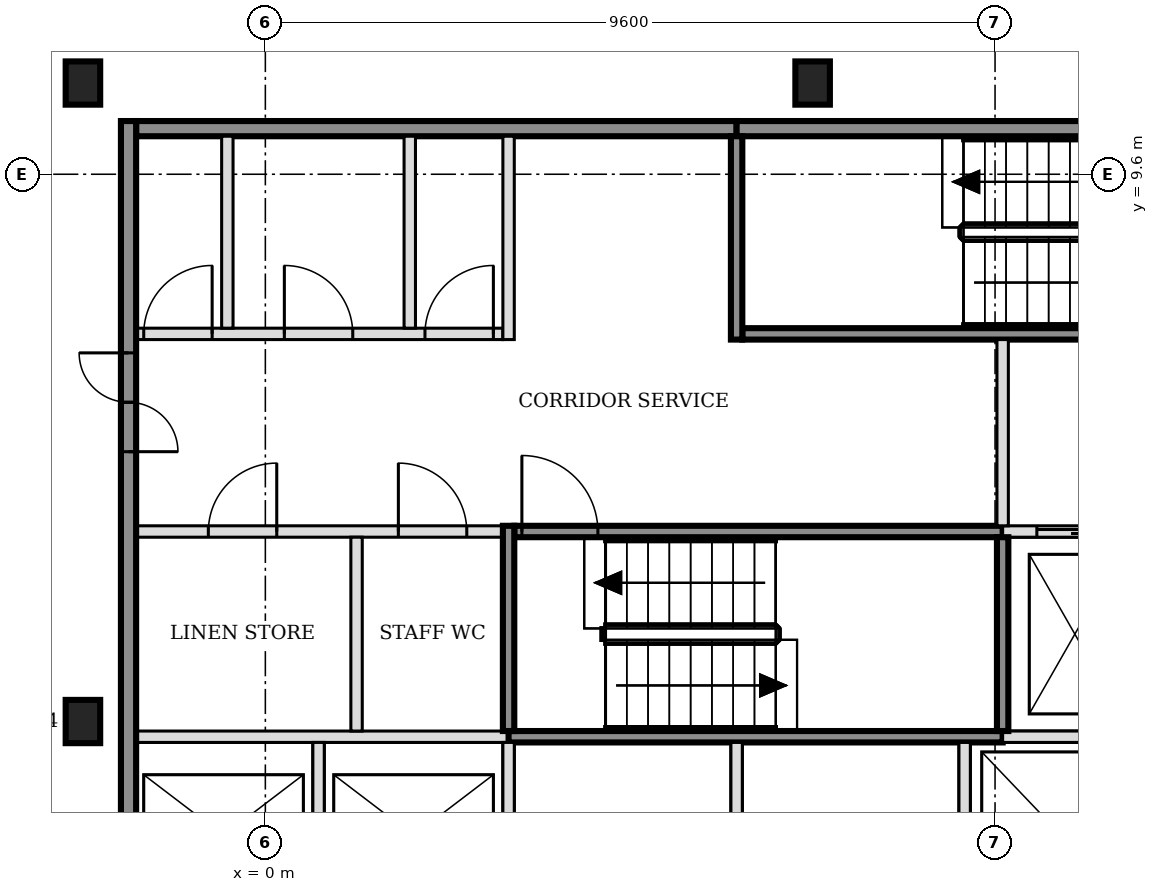
"""IFC4 building model, lengths in metres.
Left out: names, types, materials, properties, quantities, classifications, styles, units other than length and angle.
Written with IfcOpenShell. Run it as: python <this file> out.ifc"""

import sys

from ifc_helpers import new_model, si_unit, direction, frame, frame_2d, origin, origin_2d, place, context, subcontext, project, spatial, rectangle, i_section, extrude, element, fill, save


model = new_model("IFC4")
c1 = context("Model", 3, precision=1e-05, world=origin(), true_north=direction((0.0, 1.0)))
c2 = subcontext(c1, "Body", "Model", "MODEL_VIEW")
j1 = project(units=[si_unit("LENGTHUNIT", "METRE"), si_unit("PLANEANGLEUNIT", "RADIAN")], contexts=[c1])
p1 = place(None, origin())
s1 = spatial("IfcSite", under=j1, at=p1, CompositionType="ELEMENT")
p2 = place(p1, origin())
s2 = spatial("IfcBuilding", under=s1, at=p2, CompositionType="ELEMENT")
p3 = place(p2, frame((0.0, 0.0, 15.0)))
s3 = spatial("IfcBuildingStorey", under=s2, at=p3, CompositionType="ELEMENT", Elevation=15.0)
for number, where, z_axis, x_axis in (
    (1, (-2.4, 2.4, -0.2), (0.0, 0.0, 1.0), (1.0, 0.0, 0.0)),
    (2, (-2.4, 10.8, -0.2), (0.0, 0.0, 1.0), (1.0, 0.0, 0.0)),
    (3, (7.2, 10.8, -0.2), (0.0, 0.0, 1.0), (1.0, 0.0, 0.0)),
):
    element("IfcColumn", number, at=place(p3, frame(where, z_axis=z_axis, x_axis=x_axis)), inside=s3, PredefinedType="COLUMN", context=c2, shape_type="SweptSolid", body=[
        extrude(i_section(OverallWidth=0.454, OverallDepth=0.569, WebThickness=0.078, FlangeThickness=0.125, FilletRadius=0.015, at=origin_2d()), origin(), (0.0, 0.0, 1.0), 6.0),
    ])
p4 = place(p3, frame((-1.7, 2.2, 0.0), z_axis=(0.0, 0.0, 1.0), x_axis=(1.0, 0.0, 0.0)))
e4 = element("IfcWall", 4, at=p4, inside=s3, PredefinedType="SOLIDWALL", context=c2, shape_type="SweptSolid", body=[
    extrude(rectangle(XDim=4.9, YDim=0.15, at=frame_2d((2.45, 0.0))), origin(), (0.0, 0.0, 1.0), 5.8),
])
p5 = place(p3, frame((3.2, 2.2, 0.0), z_axis=(0.0, 0.0, 1.0), x_axis=(1.0, 0.0, 0.0)))
e5 = element("IfcWall", 5, at=p5, inside=s3, PredefinedType="SOLIDWALL", context=c2, shape_type="SweptSolid", body=[
    extrude(rectangle(XDim=6.5, YDim=0.15, at=frame_2d((3.25, 0.0))), origin(), (0.0, 0.0, 1.0), 5.8),
])
p6 = place(p3, frame((9.7, 2.2, 0.0), z_axis=(0.0, 0.0, 1.0), x_axis=(1.0, 0.0, 0.0)))
e6 = element("IfcWall", 6, at=p6, inside=s3, PredefinedType="SOLIDWALL", context=c2, shape_type="SweptSolid", body=[
    extrude(rectangle(XDim=4.525, YDim=0.15, at=frame_2d((2.263, 0.0))), origin(), (0.0, 0.0, 1.0), 5.8),
])
p7 = place(p3, frame((-1.7, 4.9, 0.0), z_axis=(0.0, 0.0, 1.0), x_axis=(1.0, 0.0, 0.0)))
e7 = element("IfcWall", 7, at=p7, inside=s3, PredefinedType="PARTITIONING", context=c2, shape_type="SweptSolid", body=[
    extrude(rectangle(XDim=4.825, YDim=0.15, at=frame_2d((2.413, 0.0))), origin(), (0.0, 0.0, 1.0), 5.8),
])
p8 = place(p7, frame((0.95, 0.0, 0.0)))
e8 = element("IfcOpeningElement", 8, at=p8, cuts=e7, PredefinedType="OPENING", context=c2, shape_type="SweptSolid", body=[
    extrude(rectangle(XDim=0.9, YDim=2.1, at=frame_2d((0.45, 1.05))), frame((0.0, 0.085, 0.0), z_axis=(0.0, -1.0, 0.0), x_axis=(1.0, 0.0, 0.0)), (0.0, 0.0, 1.0), 0.17),
])
p9 = place(p7, frame((3.45, 0.0, 0.0)))
e9 = element("IfcOpeningElement", 9, at=p9, cuts=e7, PredefinedType="OPENING", context=c2, shape_type="SweptSolid", body=[
    extrude(rectangle(XDim=0.9, YDim=2.1, at=frame_2d((0.45, 1.05))), frame((0.0, 0.085, 0.0), z_axis=(0.0, -1.0, 0.0), x_axis=(1.0, 0.0, 0.0)), (0.0, 0.0, 1.0), 0.17),
])
p10 = place(p3, frame((3.275, 4.9, 0.0), z_axis=(0.0, 0.0, 1.0), x_axis=(1.0, 0.0, 0.0)))
e10 = element("IfcWall", 10, at=p10, inside=s3, PredefinedType="SOLIDWALL", context=c2, shape_type="SweptSolid", body=[
    extrude(rectangle(XDim=6.425, YDim=0.15, at=frame_2d((3.212, 0.0))), origin(), (0.0, 0.0, 1.0), 5.8),
])
p11 = place(p10, frame((0.1, 0.0, 0.0)))
e11 = element("IfcOpeningElement", 11, at=p11, cuts=e10, PredefinedType="OPENING", context=c2, shape_type="SweptSolid", body=[
    extrude(rectangle(XDim=1.0, YDim=2.1, at=frame_2d((0.5, 1.05))), frame((0.0, 0.085, 0.0), z_axis=(0.0, -1.0, 0.0), x_axis=(1.0, 0.0, 0.0)), (0.0, 0.0, 1.0), 0.17),
])
p12 = place(p3, frame((9.7, 4.9, 0.0), z_axis=(0.0, 0.0, 1.0), x_axis=(1.0, 0.0, 0.0)))
e12 = element("IfcWall", 12, at=p12, inside=s3, PredefinedType="SOLIDWALL", context=c2, shape_type="SweptSolid", body=[
    extrude(rectangle(XDim=6.4, YDim=0.15, at=frame_2d((3.2, 0.0))), origin(), (0.0, 0.0, 1.0), 5.8),
])
p13 = place(p12, frame((0.45, 0.0, 0.0)))
e13 = element("IfcOpeningElement", 13, at=p13, cuts=e12, PredefinedType="OPENING", context=c2, shape_type="SweptSolid", body=[
    extrude(rectangle(XDim=1.0, YDim=2.1, at=frame_2d((0.5, 1.05))), frame((0.0, 0.085, 0.0), z_axis=(0.0, -1.0, 0.0), x_axis=(1.0, 0.0, 0.0)), (0.0, 0.0, 1.0), 0.17),
])
p14 = place(p12, frame((2.35, 0.0, 0.0)))
e14 = element("IfcOpeningElement", 14, at=p14, cuts=e12, PredefinedType="OPENING", context=c2, shape_type="SweptSolid", body=[
    extrude(rectangle(XDim=1.0, YDim=2.1, at=frame_2d((0.5, 1.05))), frame((0.0, 0.085, 0.0), z_axis=(0.0, -1.0, 0.0), x_axis=(1.0, 0.0, 0.0)), (0.0, 0.0, 1.0), 0.17),
])
p15 = place(p12, frame((4.7, 0.0, 0.0)))
e15 = element("IfcOpeningElement", 15, at=p15, cuts=e12, PredefinedType="OPENING", context=c2, shape_type="SweptSolid", body=[
    extrude(rectangle(XDim=0.9, YDim=2.1, at=frame_2d((0.45, 1.05))), frame((0.0, 0.085, 0.0), z_axis=(0.0, -1.0, 0.0), x_axis=(1.0, 0.0, 0.0)), (0.0, 0.0, 1.0), 0.17),
])
p16 = place(p3, frame((-1.7, 7.5, 0.0), z_axis=(0.0, 0.0, 1.0), x_axis=(1.0, 0.0, 0.0)))
e16 = element("IfcWall", 16, at=p16, inside=s3, PredefinedType="PARTITIONING", context=c2, shape_type="SweptSolid", body=[
    extrude(rectangle(XDim=4.825, YDim=0.15, at=frame_2d((2.413, 0.0))), origin(), (0.0, 0.0, 1.0), 5.8),
])
p17 = place(p16, frame((0.1, 0.0, 0.0)))
e17 = element("IfcOpeningElement", 17, at=p17, cuts=e16, PredefinedType="OPENING", context=c2, shape_type="SweptSolid", body=[
    extrude(rectangle(XDim=0.9, YDim=2.1, at=frame_2d((0.45, 1.05))), frame((0.0, 0.085, 0.0), z_axis=(0.0, -1.0, 0.0), x_axis=(1.0, 0.0, 0.0)), (0.0, 0.0, 1.0), 0.17),
])
p18 = place(p16, frame((1.95, 0.0, 0.0)))
e18 = element("IfcOpeningElement", 18, at=p18, cuts=e16, PredefinedType="OPENING", context=c2, shape_type="SweptSolid", body=[
    extrude(rectangle(XDim=0.9, YDim=2.1, at=frame_2d((0.45, 1.05))), frame((0.0, 0.085, 0.0), z_axis=(0.0, -1.0, 0.0), x_axis=(1.0, 0.0, 0.0)), (0.0, 0.0, 1.0), 0.17),
])
p19 = place(p16, frame((3.8, 0.0, 0.0)))
e19 = element("IfcOpeningElement", 19, at=p19, cuts=e16, PredefinedType="OPENING", context=c2, shape_type="SweptSolid", body=[
    extrude(rectangle(XDim=0.9, YDim=2.1, at=frame_2d((0.45, 1.05))), frame((0.0, 0.085, 0.0), z_axis=(0.0, -1.0, 0.0), x_axis=(1.0, 0.0, 0.0)), (0.0, 0.0, 1.0), 0.17),
])
p20 = place(p3, frame((6.275, 7.5, 0.0), z_axis=(0.0, 0.0, 1.0), x_axis=(1.0, 0.0, 0.0)))
e20 = element("IfcWall", 20, at=p20, inside=s3, PredefinedType="SOLIDWALL", context=c2, shape_type="SweptSolid", body=[
    extrude(rectangle(XDim=6.425, YDim=0.15, at=frame_2d((3.212, 0.0))), origin(), (0.0, 0.0, 1.0), 5.8),
])
p21 = place(p20, frame((5.225, 0.0, 0.0)))
e21 = element("IfcOpeningElement", 21, at=p21, cuts=e20, PredefinedType="OPENING", context=c2, shape_type="SweptSolid", body=[
    extrude(rectangle(XDim=1.0, YDim=2.1, at=frame_2d((0.5, 1.05))), frame((0.0, 0.085, 0.0), z_axis=(0.0, -1.0, 0.0), x_axis=(1.0, 0.0, 0.0)), (0.0, 0.0, 1.0), 0.17),
])
p22 = place(p3, frame((-1.7, 10.2, 0.0), z_axis=(0.0, 0.0, 1.0), x_axis=(1.0, 0.0, 0.0)))
e22 = element("IfcWall", 22, at=p22, inside=s3, PredefinedType="SOLIDWALL", context=c2, shape_type="SweptSolid", body=[
    extrude(rectangle(XDim=7.9, YDim=0.2, at=frame_2d((3.95, 0.0))), origin(), (0.0, 0.0, 1.0), 5.8),
])
p23 = place(p3, frame((6.2, 10.2, 0.0), z_axis=(0.0, 0.0, 1.0), x_axis=(1.0, 0.0, 0.0)))
e23 = element("IfcWall", 23, at=p23, inside=s3, PredefinedType="SOLIDWALL", context=c2, shape_type="SweptSolid", body=[
    extrude(rectangle(XDim=6.5, YDim=0.2, at=frame_2d((3.25, 0.0))), origin(), (0.0, 0.0, 1.0), 5.8),
])
p24 = place(p3, frame((-1.8, -5.5, 0.0), z_axis=(0.0, 0.0, 1.0), x_axis=(0.0, 1.0, 0.0)))
e24 = element("IfcWall", 24, at=p24, inside=s3, PredefinedType="SOLIDWALL", context=c2, shape_type="SweptSolid", body=[
    extrude(rectangle(XDim=15.8, YDim=0.2, at=frame_2d((7.9, 0.0))), origin(), (0.0, 0.0, 1.0), 5.8),
])
p25 = place(p24, frame((3.05, 0.0, 0.0)))
e25 = element("IfcOpeningElement", 25, at=p25, cuts=e24, PredefinedType="OPENING", context=c2, shape_type="SweptSolid", body=[
    extrude(rectangle(XDim=1.3, YDim=2.1, at=frame_2d((0.65, 1.05))), frame((0.0, 0.11, 0.0), z_axis=(0.0, -1.0, 0.0), x_axis=(1.0, 0.0, 0.0)), (0.0, 0.0, 1.0), 0.22),
])
p26 = place(p24, frame((11.45, 0.0, 0.0)))
e26 = element("IfcOpeningElement", 26, at=p26, cuts=e24, PredefinedType="OPENING", context=c2, shape_type="SweptSolid", body=[
    extrude(rectangle(XDim=1.3, YDim=2.1, at=frame_2d((0.65, 1.05))), frame((0.0, 0.11, 0.0), z_axis=(0.0, -1.0, 0.0), x_axis=(1.0, 0.0, 0.0)), (0.0, 0.0, 1.0), 0.22),
])
p27 = place(p3, frame((-0.5, 7.575, 0.0), z_axis=(0.0, 0.0, 1.0), x_axis=(0.0, 1.0, 0.0)))
e27 = element("IfcWall", 27, at=p27, inside=s3, PredefinedType="PARTITIONING", context=c2, shape_type="SweptSolid", body=[
    extrude(rectangle(XDim=2.525, YDim=0.15, at=frame_2d((1.263, 0.0))), origin(), (0.0, 0.0, 1.0), 5.8),
])
p28 = place(p3, frame((0.7, -0.325, 0.0), z_axis=(0.0, 0.0, 1.0), x_axis=(0.0, 1.0, 0.0)))
e28 = element("IfcWall", 28, at=p28, inside=s3, PredefinedType="SOLIDWALL", context=c2, shape_type="SweptSolid", body=[
    extrude(rectangle(XDim=2.45, YDim=0.15, at=frame_2d((1.225, 0.0))), origin(), (0.0, 0.0, 1.0), 5.8),
])
p29 = place(p3, frame((1.2, 2.275, 0.0), z_axis=(0.0, 0.0, 1.0), x_axis=(0.0, 1.0, 0.0)))
e29 = element("IfcWall", 29, at=p29, inside=s3, PredefinedType="PARTITIONING", context=c2, shape_type="SweptSolid", body=[
    extrude(rectangle(XDim=2.55, YDim=0.15, at=frame_2d((1.275, 0.0))), origin(), (0.0, 0.0, 1.0), 5.8),
])
p30 = place(p3, frame((1.9, 7.575, 0.0), z_axis=(0.0, 0.0, 1.0), x_axis=(0.0, 1.0, 0.0)))
e30 = element("IfcWall", 30, at=p30, inside=s3, PredefinedType="PARTITIONING", context=c2, shape_type="SweptSolid", body=[
    extrude(rectangle(XDim=2.525, YDim=0.15, at=frame_2d((1.263, 0.0))), origin(), (0.0, 0.0, 1.0), 5.8),
])
p31 = place(p3, frame((3.2, -0.325, 0.0), z_axis=(0.0, 0.0, 1.0), x_axis=(0.0, 1.0, 0.0)))
e31 = element("IfcWall", 31, at=p31, inside=s3, PredefinedType="SOLIDWALL", context=c2, shape_type="SweptSolid", body=[
    extrude(rectangle(XDim=2.45, YDim=0.15, at=frame_2d((1.225, 0.0))), origin(), (0.0, 0.0, 1.0), 5.8),
])
p32 = place(p3, frame((3.2, 2.275, 0.0), z_axis=(0.0, 0.0, 1.0), x_axis=(0.0, 1.0, 0.0)))
e32 = element("IfcWall", 32, at=p32, inside=s3, PredefinedType="SOLIDWALL", context=c2, shape_type="SweptSolid", body=[
    extrude(rectangle(XDim=2.7, YDim=0.15, at=frame_2d((1.35, 0.0))), origin(), (0.0, 0.0, 1.0), 5.8),
])
p33 = place(p3, frame((3.2, 7.425, 0.0), z_axis=(0.0, 0.0, 1.0), x_axis=(0.0, 1.0, 0.0)))
e33 = element("IfcWall", 33, at=p33, inside=s3, PredefinedType="PARTITIONING", context=c2, shape_type="SweptSolid", body=[
    extrude(rectangle(XDim=2.675, YDim=0.15, at=frame_2d((1.337, 0.0))), origin(), (0.0, 0.0, 1.0), 5.8),
])
p34 = place(p3, frame((6.2, -0.325, 0.0), z_axis=(0.0, 0.0, 1.0), x_axis=(0.0, 1.0, 0.0)))
e34 = element("IfcWall", 34, at=p34, inside=s3, PredefinedType="SOLIDWALL", context=c2, shape_type="SweptSolid", body=[
    extrude(rectangle(XDim=2.45, YDim=0.15, at=frame_2d((1.225, 0.0))), origin(), (0.0, 0.0, 1.0), 5.8),
])
p35 = place(p3, frame((6.2, 7.425, 0.0), z_axis=(0.0, 0.0, 1.0), x_axis=(0.0, 1.0, 0.0)))
e35 = element("IfcWall", 35, at=p35, inside=s3, PredefinedType="SOLIDWALL", context=c2, shape_type="SweptSolid", body=[
    extrude(rectangle(XDim=2.675, YDim=0.15, at=frame_2d((1.337, 0.0))), origin(), (0.0, 0.0, 1.0), 5.8),
])
p36 = place(p3, frame((9.2, -0.325, 0.0), z_axis=(0.0, 0.0, 1.0), x_axis=(0.0, 1.0, 0.0)))
e36 = element("IfcWall", 36, at=p36, inside=s3, PredefinedType="SOLIDWALL", context=c2, shape_type="SweptSolid", body=[
    extrude(rectangle(XDim=2.45, YDim=0.15, at=frame_2d((1.225, 0.0))), origin(), (0.0, 0.0, 1.0), 5.8),
])
p37 = place(p3, frame((9.7, 2.275, 0.0), z_axis=(0.0, 0.0, 1.0), x_axis=(0.0, 1.0, 0.0)))
e37 = element("IfcWall", 37, at=p37, inside=s3, PredefinedType="SOLIDWALL", context=c2, shape_type="SweptSolid", body=[
    extrude(rectangle(XDim=2.55, YDim=0.15, at=frame_2d((1.275, 0.0))), origin(), (0.0, 0.0, 1.0), 5.8),
])
p38 = place(p3, frame((9.7, 4.975, 0.0), z_axis=(0.0, 0.0, 1.0), x_axis=(0.0, 1.0, 0.0)))
e38 = element("IfcWall", 38, at=p38, inside=s3, PredefinedType="SOLIDWALL", context=c2, shape_type="SweptSolid", body=[
    extrude(rectangle(XDim=2.45, YDim=0.15, at=frame_2d((1.225, 0.0))), origin(), (0.0, 0.0, 1.0), 5.8),
])
p39 = place(p13, origin())
e39 = element("IfcDoor", 39, at=p39, inside=s3, OperationType="DOUBLE_DOOR_SLIDING", PredefinedType="DOOR", context=c2, shape_type="SweptSolid", body=[
    extrude(rectangle(XDim=1.0, YDim=2.1, at=frame_2d((0.5, 1.05))), frame((0.0, 0.025, 0.0), z_axis=(0.0, -1.0, 0.0), x_axis=(1.0, 0.0, 0.0)), (0.0, 0.0, 1.0), 0.05),
])
fill(e13, e39)
p40 = place(p11, origin())
e40 = element("IfcDoor", 40, at=p40, inside=s3, OperationType="SINGLE_SWING_LEFT", PredefinedType="DOOR", context=c2, shape_type="SweptSolid", body=[
    extrude(rectangle(XDim=1.0, YDim=2.1, at=frame_2d((0.5, 1.05))), frame((0.0, 0.025, 0.0), z_axis=(0.0, -1.0, 0.0), x_axis=(1.0, 0.0, 0.0)), (0.0, 0.0, 1.0), 0.05),
])
fill(e11, e40)
p41 = place(p26, origin())
e41 = element("IfcDoor", 41, at=p41, inside=s3, OperationType="DOUBLE_DOOR_SINGLE_SWING", PredefinedType="DOOR", context=c2, shape_type="SweptSolid", body=[
    extrude(rectangle(XDim=1.3, YDim=2.1, at=frame_2d((0.65, 1.05))), frame((0.0, 0.025, 0.0), z_axis=(0.0, -1.0, 0.0), x_axis=(1.0, 0.0, 0.0)), (0.0, 0.0, 1.0), 0.05),
])
fill(e26, e41)
p42 = place(p8, origin())
e42 = element("IfcDoor", 42, at=p42, inside=s3, OperationType="SINGLE_SWING_RIGHT", PredefinedType="DOOR", context=c2, shape_type="SweptSolid", body=[
    extrude(rectangle(XDim=0.9, YDim=2.1, at=frame_2d((0.45, 1.05))), frame((0.0, 0.025, 0.0), z_axis=(0.0, -1.0, 0.0), x_axis=(1.0, 0.0, 0.0)), (0.0, 0.0, 1.0), 0.05),
])
fill(e8, e42)
p43 = place(p9, origin())
e43 = element("IfcDoor", 43, at=p43, inside=s3, OperationType="SINGLE_SWING_LEFT", PredefinedType="DOOR", context=c2, shape_type="SweptSolid", body=[
    extrude(rectangle(XDim=0.9, YDim=2.1, at=frame_2d((0.45, 1.05))), frame((0.0, 0.025, 0.0), z_axis=(0.0, -1.0, 0.0), x_axis=(1.0, 0.0, 0.0)), (0.0, 0.0, 1.0), 0.05),
])
fill(e9, e43)
p44 = place(p17, origin())
e44 = element("IfcDoor", 44, at=p44, inside=s3, OperationType="SINGLE_SWING_RIGHT", PredefinedType="DOOR", context=c2, shape_type="SweptSolid", body=[
    extrude(rectangle(XDim=0.9, YDim=2.1, at=frame_2d((0.45, 1.05))), frame((0.0, 0.025, 0.0), z_axis=(0.0, -1.0, 0.0), x_axis=(1.0, 0.0, 0.0)), (0.0, 0.0, 1.0), 0.05),
])
fill(e17, e44)
p45 = place(p18, origin())
e45 = element("IfcDoor", 45, at=p45, inside=s3, OperationType="SINGLE_SWING_LEFT", PredefinedType="DOOR", context=c2, shape_type="SweptSolid", body=[
    extrude(rectangle(XDim=0.9, YDim=2.1, at=frame_2d((0.45, 1.05))), frame((0.0, 0.025, 0.0), z_axis=(0.0, -1.0, 0.0), x_axis=(1.0, 0.0, 0.0)), (0.0, 0.0, 1.0), 0.05),
])
fill(e18, e45)
p46 = place(p19, origin())
e46 = element("IfcDoor", 46, at=p46, inside=s3, OperationType="SINGLE_SWING_RIGHT", PredefinedType="DOOR", context=c2, shape_type="SweptSolid", body=[
    extrude(rectangle(XDim=0.9, YDim=2.1, at=frame_2d((0.45, 1.05))), frame((0.0, 0.025, 0.0), z_axis=(0.0, -1.0, 0.0), x_axis=(1.0, 0.0, 0.0)), (0.0, 0.0, 1.0), 0.05),
])
fill(e19, e46)
save(model, sys.argv[1])
